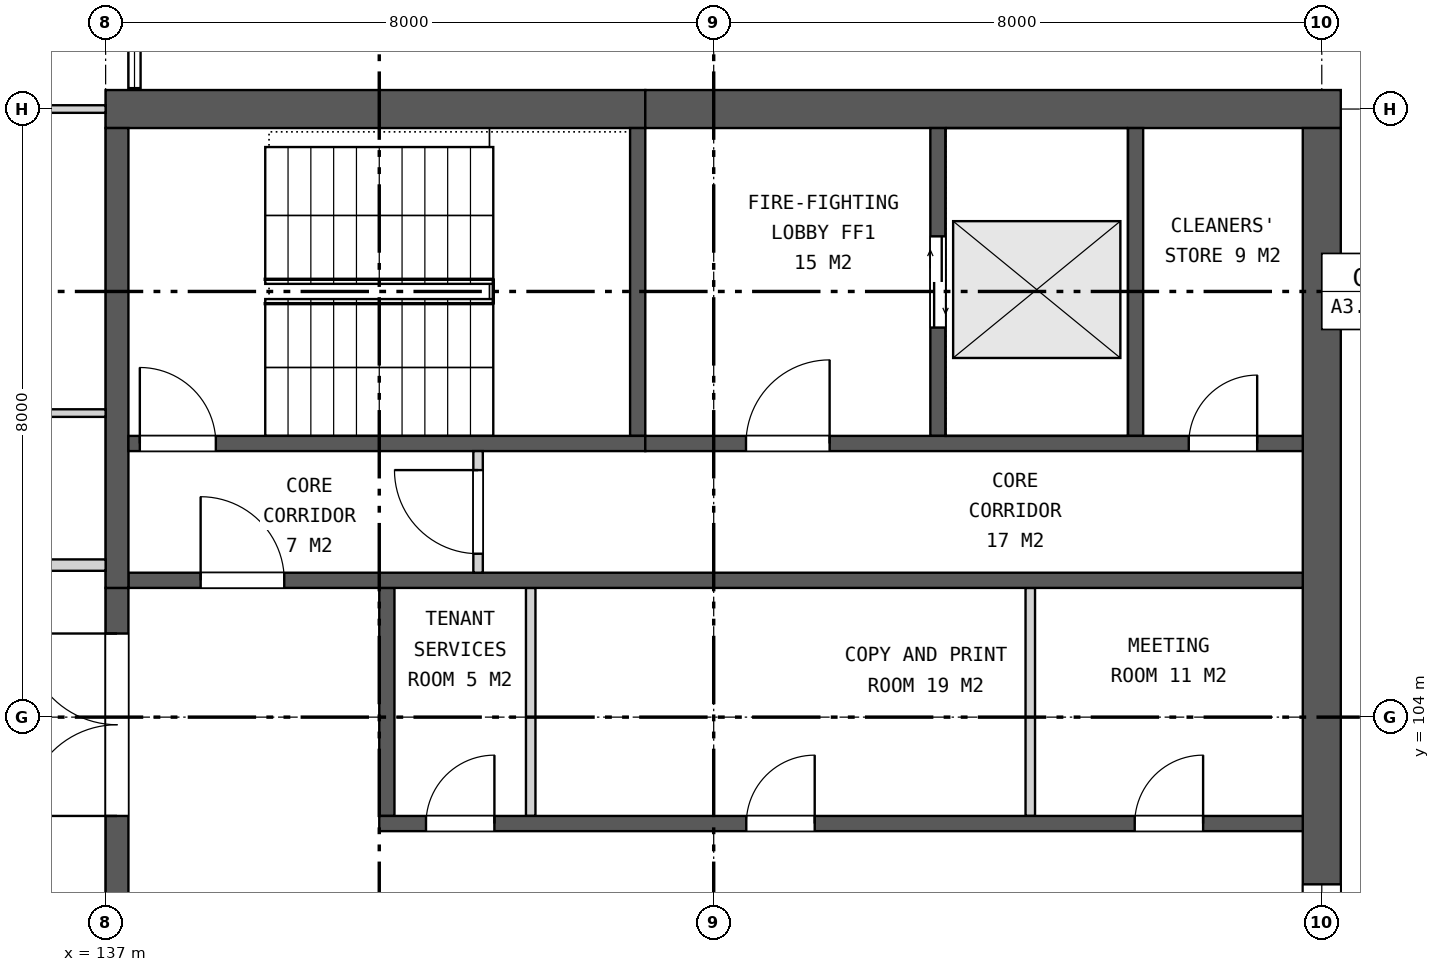
"""IFC4 building model, lengths in metres.
Left out: names, types, materials, properties, quantities, classifications, styles, units other than length and angle.
Written with IfcOpenShell. Run it as: python <this file> out.ifc"""

import sys

from ifc_helpers import new_model, si_unit, direction, frame, frame_2d, origin, place, context, subcontext, project, spatial, rectangle, extrude, element, fill, save


model = new_model("IFC4")
c1 = context("Model", 3, precision=1e-05, world=origin(), true_north=direction((0.0, 1.0)))
c2 = subcontext(c1, "Body", "Model", "MODEL_VIEW")
j1 = project(units=[si_unit("LENGTHUNIT", "METRE"), si_unit("PLANEANGLEUNIT", "RADIAN")], contexts=[c1])
p1 = place(None, origin())
s1 = spatial("IfcSite", under=j1, at=p1, CompositionType="ELEMENT")
p2 = place(p1, origin())
s2 = spatial("IfcBuilding", under=s1, at=p2, CompositionType="ELEMENT")
p3 = place(p2, frame((0.0, 0.0, 299.7)))
s3 = spatial("IfcBuildingStorey", under=s2, at=p3, CompositionType="ELEMENT", Elevation=299.7)
p4 = place(p3, frame((137.0, 112.0, 0.0), z_axis=(0.0, 0.0, 1.0), x_axis=(1.0, 0.0, 0.0)))
e1 = element("IfcWall", 1, at=p4, inside=s3, PredefinedType="SHEAR", context=c2, shape_type="SweptSolid", body=[
    extrude(rectangle(XDim=7.1, YDim=0.5, at=frame_2d((3.55, 0.0))), origin(), (0.0, 0.0, 1.0), 4.2),
])
p5 = place(p3, frame((144.1, 112.0, 0.0), z_axis=(0.0, 0.0, 1.0), x_axis=(1.0, 0.0, 0.0)))
e2 = element("IfcWall", 2, at=p5, inside=s3, PredefinedType="SHEAR", context=c2, shape_type="SweptSolid", body=[
    extrude(rectangle(XDim=9.15, YDim=0.5, at=frame_2d((4.575, 0.0))), origin(), (0.0, 0.0, 1.0), 4.2),
])
p6 = place(p3, frame((153.0, 88.25, 0.0), z_axis=(0.0, 0.0, 1.0), x_axis=(0.0, 1.0, 0.0)))
e3 = element("IfcWall", 3, at=p6, inside=s3, PredefinedType="SHEAR", context=c2, shape_type="SweptSolid", body=[
    extrude(rectangle(XDim=23.5, YDim=0.5, at=frame_2d((11.75, 0.0))), origin(), (0.0, 0.0, 1.0), 4.2),
])
p7 = place(p6, frame((9.95, 0.0, 0.15)))
e4 = element("IfcOpeningElement", 4, at=p7, cuts=e3, PredefinedType="OPENING", context=c2, shape_type="SweptSolid", body=[
    extrude(rectangle(XDim=3.6, YDim=3.0, at=frame_2d((1.8, 1.5))), frame((0.0, 0.26, 0.0), z_axis=(0.0, -1.0, 0.0), x_axis=(1.0, 0.0, 0.0)), (0.0, 0.0, 1.0), 0.52),
])
p8 = place(p3, frame((137.15, 94.3, 0.0), z_axis=(0.0, 0.0, 1.0), x_axis=(0.0, 1.0, 0.0)))
e5 = element("IfcWall", 5, at=p8, inside=s3, PredefinedType="SHEAR", context=c2, shape_type="SweptSolid", body=[
    extrude(rectangle(XDim=11.4, YDim=0.3, at=frame_2d((5.7, 0.0))), origin(), (0.0, 0.0, 1.0), 4.2),
])
p9 = place(p8, frame((0.6, 0.0, 0.0)))
e6 = element("IfcOpeningElement", 6, at=p9, cuts=e5, PredefinedType="OPENING", context=c2, shape_type="SweptSolid", body=[
    extrude(rectangle(XDim=2.4, YDim=2.4, at=frame_2d((1.2, 1.2))), frame((0.0, 0.16, 0.0), z_axis=(0.0, -1.0, 0.0), x_axis=(1.0, 0.0, 0.0)), (0.0, 0.0, 1.0), 0.32),
])
p10 = place(p8, frame((4.5, 0.0, 0.0)))
e7 = element("IfcOpeningElement", 7, at=p10, cuts=e5, PredefinedType="OPENING", context=c2, shape_type="SweptSolid", body=[
    extrude(rectangle(XDim=2.4, YDim=2.4, at=frame_2d((1.2, 1.2))), frame((0.0, 0.16, 0.0), z_axis=(0.0, -1.0, 0.0), x_axis=(1.0, 0.0, 0.0)), (0.0, 0.0, 1.0), 0.32),
])
p11 = place(p8, frame((8.4, 0.0, 0.0)))
e8 = element("IfcOpeningElement", 8, at=p11, cuts=e5, PredefinedType="OPENING", context=c2, shape_type="SweptSolid", body=[
    extrude(rectangle(XDim=2.4, YDim=2.4, at=frame_2d((1.2, 1.2))), frame((0.0, 0.16, 0.0), z_axis=(0.0, -1.0, 0.0), x_axis=(1.0, 0.0, 0.0)), (0.0, 0.0, 1.0), 0.32),
])
p12 = place(p3, frame((140.7, 102.7, 0.0), z_axis=(0.0, 0.0, 1.0), x_axis=(0.0, 1.0, 0.0)))
e9 = element("IfcWall", 9, at=p12, inside=s3, PredefinedType="SHEAR", context=c2, shape_type="SweptSolid", body=[
    extrude(rectangle(XDim=3.0, YDim=0.2, at=frame_2d((1.5, 0.0))), origin(), (0.0, 0.0, 1.0), 4.2),
])
for number, where, z_axis, x_axis in (
    (10, (142.593, 102.7, 0.0), (0.0, 0.0, 1.0), (0.0, 1.0, 0.0)),
    (11, (149.165, 102.7, 0.0), (0.0, 0.0, 1.0), (0.0, 1.0, 0.0)),
):
    element("IfcWall", number, at=place(p3, frame(where, z_axis=z_axis, x_axis=x_axis)), inside=s3, PredefinedType="PARTITIONING", context=c2, shape_type="SweptSolid", body=[
        extrude(rectangle(XDim=3.0, YDim=0.125, at=frame_2d((1.5, 0.0))), origin(), (0.0, 0.0, 1.0), 4.2),
    ])
p13 = place(p3, frame((140.6, 102.6, 0.0), z_axis=(0.0, 0.0, 1.0), x_axis=(1.0, 0.0, 0.0)))
e12 = element("IfcWall", 12, at=p13, inside=s3, PredefinedType="SHEAR", context=c2, shape_type="SweptSolid", body=[
    extrude(rectangle(XDim=12.15, YDim=0.2, at=frame_2d((6.075, 0.0))), origin(), (0.0, 0.0, 1.0), 4.2),
])
p14 = place(p13, frame((0.615, 0.0, 0.0)))
e13 = element("IfcOpeningElement", 13, at=p14, cuts=e12, PredefinedType="OPENING", context=c2, shape_type="SweptSolid", body=[
    extrude(rectangle(XDim=0.9, YDim=2.1, at=frame_2d((0.45, 1.05))), frame((0.0, 0.11, 0.0), z_axis=(0.0, -1.0, 0.0), x_axis=(1.0, 0.0, 0.0)), (0.0, 0.0, 1.0), 0.22),
])
p15 = place(p13, frame((4.829, 0.0, 0.0)))
e14 = element("IfcOpeningElement", 14, at=p15, cuts=e12, PredefinedType="OPENING", context=c2, shape_type="SweptSolid", body=[
    extrude(rectangle(XDim=0.9, YDim=2.1, at=frame_2d((0.45, 1.05))), frame((0.0, 0.11, 0.0), z_axis=(0.0, -1.0, 0.0), x_axis=(1.0, 0.0, 0.0)), (0.0, 0.0, 1.0), 0.22),
])
p16 = place(p13, frame((9.939, 0.0, 0.0)))
e15 = element("IfcOpeningElement", 15, at=p16, cuts=e12, PredefinedType="OPENING", context=c2, shape_type="SweptSolid", body=[
    extrude(rectangle(XDim=0.9, YDim=2.1, at=frame_2d((0.45, 1.05))), frame((0.0, 0.11, 0.0), z_axis=(0.0, -1.0, 0.0), x_axis=(1.0, 0.0, 0.0)), (0.0, 0.0, 1.0), 0.22),
])
p17 = place(p3, frame((137.3, 105.8, 0.0), z_axis=(0.0, 0.0, 1.0), x_axis=(1.0, 0.0, 0.0)))
e16 = element("IfcWall", 16, at=p17, inside=s3, PredefinedType="SHEAR", context=c2, shape_type="SweptSolid", body=[
    extrude(rectangle(XDim=15.45, YDim=0.2, at=frame_2d((7.725, 0.0))), origin(), (0.0, 0.0, 1.0), 4.2),
])
p18 = place(p17, frame((0.95, 0.0, 0.0)))
e17 = element("IfcOpeningElement", 17, at=p18, cuts=e16, PredefinedType="OPENING", context=c2, shape_type="SweptSolid", body=[
    extrude(rectangle(XDim=1.1, YDim=2.1, at=frame_2d((0.55, 1.05))), frame((0.0, 0.11, 0.0), z_axis=(0.0, -1.0, 0.0), x_axis=(1.0, 0.0, 0.0)), (0.0, 0.0, 1.0), 0.22),
])
p19 = place(p3, frame((137.15, 105.7, 0.0), z_axis=(0.0, 0.0, 1.0), x_axis=(0.0, 1.0, 0.0)))
e18 = element("IfcWall", 18, at=p19, inside=s3, PredefinedType="SHEAR", context=c2, shape_type="SweptSolid", body=[
    extrude(rectangle(XDim=6.05, YDim=0.3, at=frame_2d((3.025, 0.0))), origin(), (0.0, 0.0, 1.0), 4.2),
])
p20 = place(p3, frame((144.0, 107.7, 0.0), z_axis=(0.0, 0.0, 1.0), x_axis=(0.0, 1.0, 0.0)))
e19 = element("IfcWall", 19, at=p20, inside=s3, PredefinedType="SHEAR", context=c2, shape_type="SweptSolid", body=[
    extrude(rectangle(XDim=4.05, YDim=0.2, at=frame_2d((2.025, 0.0))), origin(), (0.0, 0.0, 1.0), 4.2),
])
p21 = place(p3, frame((147.95, 107.7, 0.0), z_axis=(0.0, 0.0, 1.0), x_axis=(0.0, 1.0, 0.0)))
e20 = element("IfcWall", 20, at=p21, inside=s3, PredefinedType="SHEAR", context=c2, shape_type="SweptSolid", body=[
    extrude(rectangle(XDim=4.05, YDim=0.2, at=frame_2d((2.025, 0.0))), origin(), (0.0, 0.0, 1.0), 4.2),
])
p22 = place(p21, frame((1.425, 0.0, 0.0)))
e21 = element("IfcOpeningElement", 21, at=p22, cuts=e20, PredefinedType="OPENING", context=c2, shape_type="SweptSolid", body=[
    extrude(rectangle(XDim=1.2, YDim=2.1, at=frame_2d((0.6, 1.05))), frame((0.0, 0.11, 0.0), z_axis=(0.0, -1.0, 0.0), x_axis=(1.0, 0.0, 0.0)), (0.0, 0.0, 1.0), 0.22),
])
p23 = place(p3, frame((150.55, 107.7, 0.0), z_axis=(0.0, 0.0, 1.0), x_axis=(0.0, 1.0, 0.0)))
e22 = element("IfcWall", 22, at=p23, inside=s3, PredefinedType="SHEAR", context=c2, shape_type="SweptSolid", body=[
    extrude(rectangle(XDim=4.05, YDim=0.2, at=frame_2d((2.025, 0.0))), origin(), (0.0, 0.0, 1.0), 4.2),
])
p24 = place(p3, frame((137.3, 107.6, 0.0), z_axis=(0.0, 0.0, 1.0), x_axis=(1.0, 0.0, 0.0)))
e23 = element("IfcWall", 23, at=p24, inside=s3, PredefinedType="SHEAR", context=c2, shape_type="SweptSolid", body=[
    extrude(rectangle(XDim=6.8, YDim=0.2, at=frame_2d((3.4, 0.0))), origin(), (0.0, 0.0, 1.0), 4.2),
])
p25 = place(p24, frame((0.15, 0.0, 0.0)))
e24 = element("IfcOpeningElement", 24, at=p25, cuts=e23, PredefinedType="OPENING", context=c2, shape_type="SweptSolid", body=[
    extrude(rectangle(XDim=1.0, YDim=2.1, at=frame_2d((0.5, 1.05))), frame((0.0, 0.11, 0.0), z_axis=(0.0, -1.0, 0.0), x_axis=(1.0, 0.0, 0.0)), (0.0, 0.0, 1.0), 0.22),
])
p26 = place(p3, frame((144.1, 107.6, 0.0), z_axis=(0.0, 0.0, 1.0), x_axis=(1.0, 0.0, 0.0)))
e25 = element("IfcWall", 25, at=p26, inside=s3, PredefinedType="SHEAR", context=c2, shape_type="SweptSolid", body=[
    extrude(rectangle(XDim=8.65, YDim=0.2, at=frame_2d((4.325, 0.0))), origin(), (0.0, 0.0, 1.0), 4.2),
])
p27 = place(p26, frame((1.325, 0.0, 0.0)))
e26 = element("IfcOpeningElement", 26, at=p27, cuts=e25, PredefinedType="OPENING", context=c2, shape_type="SweptSolid", body=[
    extrude(rectangle(XDim=1.1, YDim=2.1, at=frame_2d((0.55, 1.05))), frame((0.0, 0.11, 0.0), z_axis=(0.0, -1.0, 0.0), x_axis=(1.0, 0.0, 0.0)), (0.0, 0.0, 1.0), 0.22),
])
p28 = place(p26, frame((7.15, 0.0, 0.0)))
e27 = element("IfcOpeningElement", 27, at=p28, cuts=e25, PredefinedType="OPENING", context=c2, shape_type="SweptSolid", body=[
    extrude(rectangle(XDim=0.9, YDim=2.1, at=frame_2d((0.45, 1.05))), frame((0.0, 0.11, 0.0), z_axis=(0.0, -1.0, 0.0), x_axis=(1.0, 0.0, 0.0)), (0.0, 0.0, 1.0), 0.22),
])
p29 = place(p3, frame((141.9, 105.9, 0.0), z_axis=(0.0, 0.0, 1.0), x_axis=(0.0, 1.0, 0.0)))
e28 = element("IfcWall", 28, at=p29, inside=s3, PredefinedType="PARTITIONING", context=c2, shape_type="SweptSolid", body=[
    extrude(rectangle(XDim=1.6, YDim=0.125, at=frame_2d((0.8, 0.0))), origin(), (0.0, 0.0, 1.0), 4.2),
])
p30 = place(p29, frame((0.25, 0.0, 0.0)))
e29 = element("IfcOpeningElement", 29, at=p30, cuts=e28, PredefinedType="OPENING", context=c2, shape_type="SweptSolid", body=[
    extrude(rectangle(XDim=1.1, YDim=2.1, at=frame_2d((0.55, 1.05))), frame((0.0, 0.073, 0.0), z_axis=(0.0, -1.0, 0.0), x_axis=(1.0, 0.0, 0.0)), (0.0, 0.0, 1.0), 0.145),
])
p31 = place(p3, frame((131.475, 106.0, 0.0), z_axis=(0.0, 0.0, 1.0), x_axis=(1.0, 0.0, 0.0)))
e30 = element("IfcWall", 30, at=p31, inside=s3, PredefinedType="PARTITIONING", context=c2, shape_type="SweptSolid", body=[
    extrude(rectangle(XDim=5.525, YDim=0.15, at=frame_2d((2.762, 0.0))), origin(), (0.0, 0.0, 1.0), 3.255),
])
for number, where, z_axis, x_axis in (
    (31, (131.475, 108.0, 0.0), (0.0, 0.0, 1.0), (1.0, 0.0, 0.0)),
    (32, (131.475, 112.0, 0.0), (0.0, 0.0, 1.0), (1.0, 0.0, 0.0)),
):
    element("IfcWall", number, at=place(p3, frame(where, z_axis=z_axis, x_axis=x_axis)), inside=s3, PredefinedType="PARTITIONING", context=c2, shape_type="SweptSolid", body=[
        extrude(rectangle(XDim=5.525, YDim=0.1, at=frame_2d((2.762, 0.0))), origin(), (0.0, 0.0, 1.0), 3.255),
    ])
p32 = place(p7, origin())
e33 = element("IfcWindow", 33, at=p32, inside=s3, PartitioningType="SINGLE_PANEL", PredefinedType="WINDOW", context=c2, shape_type="SweptSolid", body=[
    extrude(rectangle(XDim=3.6, YDim=3.0, at=frame_2d((1.8, 1.5))), frame((0.0, 0.03, 0.0), z_axis=(0.0, -1.0, 0.0), x_axis=(1.0, 0.0, 0.0)), (0.0, 0.0, 1.0), 0.06),
])
fill(e4, e33)
p33 = place(p11, origin())
e34 = element("IfcDoor", 34, at=p33, inside=s3, OperationType="DOUBLE_DOOR_SINGLE_SWING", PredefinedType="DOOR", context=c2, shape_type="SweptSolid", body=[
    extrude(rectangle(XDim=2.4, YDim=2.4, at=frame_2d((1.2, 1.2))), frame((0.0, 0.025, 0.0), z_axis=(0.0, -1.0, 0.0), x_axis=(1.0, 0.0, 0.0)), (0.0, 0.0, 1.0), 0.05),
])
fill(e8, e34)
p34 = place(p14, origin())
e35 = element("IfcDoor", 35, at=p34, inside=s3, OperationType="SINGLE_SWING_RIGHT", PredefinedType="DOOR", context=c2, shape_type="SweptSolid", body=[
    extrude(rectangle(XDim=0.9, YDim=2.1, at=frame_2d((0.45, 1.05))), frame((0.0, 0.025, 0.0), z_axis=(0.0, -1.0, 0.0), x_axis=(1.0, 0.0, 0.0)), (0.0, 0.0, 1.0), 0.05),
])
fill(e13, e35)
p35 = place(p15, origin())
e36 = element("IfcDoor", 36, at=p35, inside=s3, OperationType="SINGLE_SWING_RIGHT", PredefinedType="DOOR", context=c2, shape_type="SweptSolid", body=[
    extrude(rectangle(XDim=0.9, YDim=2.1, at=frame_2d((0.45, 1.05))), frame((0.0, 0.025, 0.0), z_axis=(0.0, -1.0, 0.0), x_axis=(1.0, 0.0, 0.0)), (0.0, 0.0, 1.0), 0.05),
])
fill(e14, e36)
p36 = place(p16, origin())
e37 = element("IfcDoor", 37, at=p36, inside=s3, OperationType="SINGLE_SWING_RIGHT", PredefinedType="DOOR", context=c2, shape_type="SweptSolid", body=[
    extrude(rectangle(XDim=0.9, YDim=2.1, at=frame_2d((0.45, 1.05))), frame((0.0, 0.025, 0.0), z_axis=(0.0, -1.0, 0.0), x_axis=(1.0, 0.0, 0.0)), (0.0, 0.0, 1.0), 0.05),
])
fill(e15, e37)
p37 = place(p18, origin())
e38 = element("IfcDoor", 38, at=p37, inside=s3, OperationType="SINGLE_SWING_LEFT", PredefinedType="DOOR", context=c2, shape_type="SweptSolid", body=[
    extrude(rectangle(XDim=1.1, YDim=2.1, at=frame_2d((0.55, 1.05))), frame((0.0, 0.025, 0.0), z_axis=(0.0, -1.0, 0.0), x_axis=(1.0, 0.0, 0.0)), (0.0, 0.0, 1.0), 0.05),
])
fill(e17, e38)
p38 = place(p22, origin())
e39 = element("IfcDoor", 39, at=p38, inside=s3, OperationType="DOUBLE_DOOR_SLIDING", PredefinedType="DOOR", context=c2, shape_type="SweptSolid", body=[
    extrude(rectangle(XDim=1.2, YDim=2.1, at=frame_2d((0.6, 1.05))), frame((0.0, 0.025, 0.0), z_axis=(0.0, -1.0, 0.0), x_axis=(1.0, 0.0, 0.0)), (0.0, 0.0, 1.0), 0.05),
])
fill(e21, e39)
p39 = place(p25, origin())
e40 = element("IfcDoor", 40, at=p39, inside=s3, OperationType="SINGLE_SWING_LEFT", PredefinedType="DOOR", context=c2, shape_type="SweptSolid", body=[
    extrude(rectangle(XDim=1.0, YDim=2.1, at=frame_2d((0.5, 1.05))), frame((0.0, 0.025, 0.0), z_axis=(0.0, -1.0, 0.0), x_axis=(1.0, 0.0, 0.0)), (0.0, 0.0, 1.0), 0.05),
])
fill(e24, e40)
p40 = place(p27, origin())
e41 = element("IfcDoor", 41, at=p40, inside=s3, OperationType="SINGLE_SWING_RIGHT", PredefinedType="DOOR", context=c2, shape_type="SweptSolid", body=[
    extrude(rectangle(XDim=1.1, YDim=2.1, at=frame_2d((0.55, 1.05))), frame((0.0, 0.025, 0.0), z_axis=(0.0, -1.0, 0.0), x_axis=(1.0, 0.0, 0.0)), (0.0, 0.0, 1.0), 0.05),
])
fill(e26, e41)
p41 = place(p28, origin())
e42 = element("IfcDoor", 42, at=p41, inside=s3, OperationType="SINGLE_SWING_RIGHT", PredefinedType="DOOR", context=c2, shape_type="SweptSolid", body=[
    extrude(rectangle(XDim=0.9, YDim=2.1, at=frame_2d((0.45, 1.05))), frame((0.0, 0.025, 0.0), z_axis=(0.0, -1.0, 0.0), x_axis=(1.0, 0.0, 0.0)), (0.0, 0.0, 1.0), 0.05),
])
fill(e27, e42)
p42 = place(p30, origin())
e43 = element("IfcDoor", 43, at=p42, inside=s3, OperationType="SINGLE_SWING_RIGHT", PredefinedType="DOOR", context=c2, shape_type="SweptSolid", body=[
    extrude(rectangle(XDim=1.1, YDim=2.1, at=frame_2d((0.55, 1.05))), frame((0.0, 0.025, 0.0), z_axis=(0.0, -1.0, 0.0), x_axis=(1.0, 0.0, 0.0)), (0.0, 0.0, 1.0), 0.05),
])
fill(e29, e43)
save(model, sys.argv[1])
